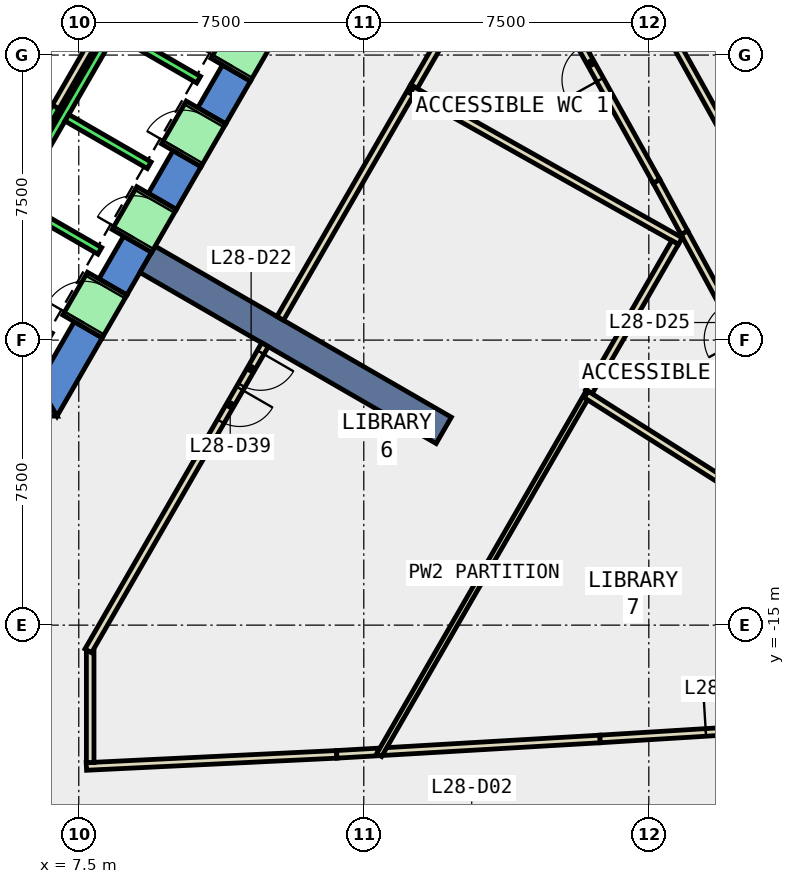
"""IFC4 building model, lengths in metres.
Left out: names, types, materials, properties, quantities, classifications, styles, units other than length and angle.
Written with IfcOpenShell. Run it as: python <this file> out.ifc"""

import sys

from ifc_helpers import new_model, si_unit, direction, frame, frame_2d, origin, place, context, subcontext, project, spatial, polyline, rectangle, outline, extrude, element, fill, save


model = new_model("IFC4")
c1 = context("Model", 3, precision=1e-05, world=origin(), true_north=direction((0.0, 1.0)))
c2 = subcontext(c1, "Body", "Model", "MODEL_VIEW")
j1 = project(units=[si_unit("LENGTHUNIT", "METRE"), si_unit("PLANEANGLEUNIT", "RADIAN")], contexts=[c1])
p1 = place(None, origin())
s1 = spatial("IfcSite", under=j1, at=p1, CompositionType="ELEMENT")
p2 = place(p1, origin())
s2 = spatial("IfcBuilding", under=s1, at=p2, CompositionType="ELEMENT")
p3 = place(p2, frame((0.0, 0.0, 128.6)))
s3 = spatial("IfcBuildingStorey", under=s2, at=p3, CompositionType="ELEMENT", Elevation=128.6)
p4 = place(p3, frame((0.0, 0.0, -0.4)))
e1 = element("IfcWall", 1, at=p4, inside=s3, PredefinedType="SHEAR", context=c2, shape_type="SweptSolid", body=[
    extrude(outline(polyline([(5.75, -8.65), (5.75, -9.5), (6.928, -9.5), (6.437, -8.65), (5.75, -8.65)])), origin(), (0.0, 0.0, 1.0), 4.0),
])
p5 = place(p3, frame((0.0, 0.0, -0.4)))
e2 = element("IfcWall", 2, at=p5, inside=s3, PredefinedType="SHEAR", context=c2, shape_type="SweptSolid", body=[
    extrude(outline(polyline([(8.117, -7.44), (7.381, -7.015), (6.437, -8.65), (6.928, -9.5), (8.117, -7.44)])), origin(), (0.0, 0.0, 1.0), 4.0),
])
p6 = place(p3, frame((0.0, 0.0, -0.4)))
e3 = element("IfcWall", 3, at=p6, inside=s3, PredefinedType="SHEAR", context=c2, shape_type="SweptSolid", body=[
    extrude(outline(polyline([(9.417, -5.189), (8.681, -4.764), (8.031, -5.889), (8.767, -6.314), (9.417, -5.189)])), origin(), (0.0, 0.0, 1.0), 4.0),
])
p7 = place(p3, frame((0.0, 0.0, -0.4)))
e4 = element("IfcWall", 4, at=p7, inside=s3, PredefinedType="SHEAR", context=c2, shape_type="SweptSolid", body=[
    extrude(outline(polyline([(10.717, -2.937), (9.981, -2.512), (9.331, -3.638), (10.067, -4.063), (10.717, -2.937)])), origin(), (0.0, 0.0, 1.0), 4.0),
])
p8 = place(p3, frame((0.0, 0.0, -0.4)))
e5 = element("IfcWall", 5, at=p8, inside=s3, PredefinedType="SHEAR", context=c2, shape_type="SweptSolid", body=[
    extrude(outline(polyline([(12.017, -0.686), (11.281, -0.261), (10.631, -1.386), (11.367, -1.811), (12.017, -0.686)])), origin(), (0.0, 0.0, 1.0), 4.0),
])
p9 = place(p3, frame((9.31, -5.375, -0.4), z_axis=(0.0, 0.0, 1.0), x_axis=(0.866017533419, -0.500013631625, 0.0)))
e6 = element("IfcWall", 6, at=p9, inside=s3, PredefinedType="SHEAR", context=c2, shape_type="SweptSolid", body=[
    extrude(rectangle(XDim=9.0, YDim=0.8, at=frame_2d((4.5, 0.0))), origin(), (0.0, 0.0, 1.0), 4.0),
])
p10 = place(p3, frame((7.7, -18.719, 0.0), z_axis=(0.0, 0.0, 1.0), x_axis=(0.998829118209, 0.048377604502, 0.0)))
e7 = element("IfcWall", 7, at=p10, inside=s3, PredefinedType="PARTITIONING", context=c2, shape_type="SweptSolid", body=[
    extrude(rectangle(XDim=6.596, YDim=0.2, at=frame_2d((3.298, 0.0))), origin(), (0.0, 0.0, 1.0), 3.6),
])
p11 = place(p3, frame((14.288, -18.4, 0.0), z_axis=(0.0, 0.0, 1.0), x_axis=(0.998339941676, 0.057596535097, 0.0)))
e8 = element("IfcWall", 8, at=p11, inside=s3, PredefinedType="PARTITIONING", context=c2, shape_type="SweptSolid", body=[
    extrude(rectangle(XDim=1.094, YDim=0.2, at=frame_2d((0.547, 0.0))), origin(), (0.0, 0.0, 1.0), 3.6),
])
p12 = place(p3, frame((23.437, -4.676, 0.0), z_axis=(0.0, 0.0, 1.0), x_axis=(-0.47686467088, 0.878976726465, 0.0)))
e9 = element("IfcWall", 9, at=p12, inside=s3, PredefinedType="PARTITIONING", context=c2, shape_type="SweptSolid", body=[
    extrude(rectangle(XDim=1.542, YDim=0.2, at=frame_2d((0.771, 0.0))), origin(), (0.0, 0.0, 1.0), 3.6),
])
p13 = place(p3, frame((22.702, -3.321, 0.0), z_axis=(0.0, 0.0, 1.0), x_axis=(-0.486304341235, 0.873789498504, 0.0)))
e10 = element("IfcWall", 10, at=p13, inside=s3, PredefinedType="PARTITIONING", context=c2, shape_type="SweptSolid", body=[
    extrude(rectangle(XDim=7.113, YDim=0.2, at=frame_2d((3.556, 0.0))), origin(), (0.0, 0.0, 1.0), 3.6),
])
p14 = place(p13, frame((3.057, 0.0, 0.0)))
e11 = element("IfcOpeningElement", 11, at=p14, cuts=e10, PredefinedType="OPENING", context=c2, shape_type="SweptSolid", body=[
    extrude(rectangle(XDim=1.0, YDim=2.1, at=frame_2d((0.5, 1.05))), frame((0.0, 0.11, 0.0), z_axis=(0.0, -1.0, 0.0), x_axis=(1.0, 0.0, 0.0)), (0.0, 0.0, 1.0), 0.22),
])
p15 = place(p3, frame((15.529, -18.328, 0.0), z_axis=(0.0, 0.0, 1.0), x_axis=(0.998293671523, 0.058393025246, 0.0)))
e12 = element("IfcWall", 12, at=p15, inside=s3, PredefinedType="PARTITIONING", context=c2, shape_type="SweptSolid", body=[
    extrude(rectangle(XDim=5.699, YDim=0.2, at=frame_2d((2.849, 0.0))), origin(), (0.0, 0.0, 1.0), 3.6),
])
p16 = place(p3, frame((21.218, -17.995, 0.0), z_axis=(0.0, 0.0, 1.0), x_axis=(0.998092528214, 0.061735768594, 0.0)))
e13 = element("IfcWall", 13, at=p16, inside=s3, PredefinedType="PARTITIONING", context=c2, shape_type="SweptSolid", body=[
    extrude(rectangle(XDim=6.576, YDim=0.2, at=frame_2d((3.288, 0.0))), origin(), (0.0, 0.0, 1.0), 3.6),
])
p17 = place(p16, frame((2.788, 0.0, 0.0)))
e14 = element("IfcOpeningElement", 14, at=p17, cuts=e13, PredefinedType="OPENING", context=c2, shape_type="SweptSolid", body=[
    extrude(rectangle(XDim=1.0, YDim=2.1, at=frame_2d((0.5, 1.05))), frame((0.0, 0.11, 0.0), z_axis=(0.0, -1.0, 0.0), x_axis=(1.0, 0.0, 0.0)), (0.0, 0.0, 1.0), 0.22),
])
p18 = place(p3, frame((26.095, -9.574, 0.0), z_axis=(0.0, 0.0, 1.0), x_axis=(-0.476963271937, 0.878923226012, 0.0)))
e15 = element("IfcWall", 15, at=p18, inside=s3, PredefinedType="PARTITIONING", context=c2, shape_type="SweptSolid", body=[
    extrude(rectangle(XDim=5.573, YDim=0.2, at=frame_2d((2.786, 0.0))), origin(), (0.0, 0.0, 1.0), 3.6),
])
p19 = place(p18, frame((2.386, 0.0, 0.0)))
e16 = element("IfcOpeningElement", 16, at=p19, cuts=e15, PredefinedType="OPENING", context=c2, shape_type="SweptSolid", body=[
    extrude(rectangle(XDim=1.0, YDim=2.1, at=frame_2d((0.5, 1.05))), frame((0.0, 0.11, 0.0), z_axis=(0.0, -1.0, 0.0), x_axis=(1.0, 0.0, 0.0)), (0.0, 0.0, 1.0), 0.22),
])
p20 = place(p3, frame((21.124, 4.04, 0.0), z_axis=(0.0, 0.0, 1.0), x_axis=(0.486229558972, -0.873831114107, 0.0)))
e17 = element("IfcWall", 17, at=p20, inside=s3, PredefinedType="PARTITIONING", context=c2, shape_type="SweptSolid", body=[
    extrude(rectangle(XDim=7.136, YDim=0.2, at=frame_2d((3.568, 0.0))), origin(), (0.0, 0.0, 1.0), 3.6),
])
p21 = place(p20, frame((3.143, 0.0, 0.0)))
e18 = element("IfcOpeningElement", 18, at=p21, cuts=e17, PredefinedType="OPENING", context=c2, shape_type="SweptSolid", body=[
    extrude(rectangle(XDim=1.0, YDim=2.1, at=frame_2d((0.5, 1.05))), frame((0.0, 0.11, 0.0), z_axis=(0.0, -1.0, 0.0), x_axis=(1.0, 0.0, 0.0)), (0.0, 0.0, 1.0), 0.22),
])
p22 = place(p3, frame((6.826, 0.522, 0.0), z_axis=(0.0, 0.0, 1.0), x_axis=(-0.500016722714, -0.866015748706, 0.0)))
e19 = element("IfcWall", 19, at=p22, inside=s3, PredefinedType="PARTITIONING", context=c2, shape_type="SweptSolid", body=[
    extrude(rectangle(XDim=1.7, YDim=0.2, at=frame_2d((0.85, 0.0))), origin(), (0.0, 0.0, 1.0), 3.6),
])
p23 = place(p3, frame((8.192, 0.888, 0.0), z_axis=(0.0, 0.0, 1.0), x_axis=(-0.499940625693, -0.866059680843, 0.0)))
e20 = element("IfcWall", 20, at=p23, inside=s3, PredefinedType="PARTITIONING", context=c2, shape_type="SweptSolid", body=[
    extrude(rectangle(XDim=2.68, YDim=0.2, at=frame_2d((1.34, 0.0))), origin(), (0.0, 0.0, 1.0), 3.6),
])
p24 = place(p3, frame((7.8, -15.69, 0.0), z_axis=(0.0, 0.0, 1.0), x_axis=(0.0, -1.0, 0.0)))
e21 = element("IfcWall", 21, at=p24, inside=s3, PredefinedType="PARTITIONING", context=c2, shape_type="SweptSolid", body=[
    extrude(rectangle(XDim=2.924, YDim=0.2, at=frame_2d((1.462, 0.0))), origin(), (0.0, 0.0, 1.0), 3.6),
])
p25 = place(p3, frame((16.32, -0.832, 0.0), z_axis=(0.0, 0.0, 1.0), x_axis=(-0.499951642806, -0.866053321023, 0.0)))
e22 = element("IfcWall", 22, at=p25, inside=s3, PredefinedType="PARTITIONING", context=c2, shape_type="SweptSolid", body=[
    extrude(rectangle(XDim=7.039, YDim=0.2, at=frame_2d((3.52, 0.0))), origin(), (0.0, 0.0, 1.0), 3.6),
])
p26 = place(p3, frame((18.91, 3.653, 0.0), z_axis=(0.0, 0.0, 1.0), x_axis=(-0.500052967229, -0.865994820981, 0.0)))
e23 = element("IfcWall", 23, at=p26, inside=s3, PredefinedType="PARTITIONING", context=c2, shape_type="SweptSolid", body=[
    extrude(rectangle(XDim=5.179, YDim=0.2, at=frame_2d((2.59, 0.0))), origin(), (0.0, 0.0, 1.0), 3.6),
])
p27 = place(p3, frame((16.27, -0.919, 0.0), z_axis=(0.0, 0.0, 1.0), x_axis=(0.871308980511, -0.490734816863, 0.0)))
e24 = element("IfcWall", 24, at=p27, inside=s3, PredefinedType="PARTITIONING", context=c2, shape_type="SweptSolid", body=[
    extrude(rectangle(XDim=8.1, YDim=0.2, at=frame_2d((4.05, 0.0))), origin(), (0.0, 0.0, 1.0), 3.6),
])
p28 = place(p3, frame((20.924, -8.858, 0.0), z_axis=(0.0, 0.0, 1.0), x_axis=(-0.499996828157, -0.866027235041, 0.0)))
e25 = element("IfcWall", 25, at=p28, inside=s3, PredefinedType="PARTITIONING", context=c2, shape_type="SweptSolid", body=[
    extrude(rectangle(XDim=11.04, YDim=0.15, at=frame_2d((5.52, 0.0))), origin(), (0.0, 0.0, 1.0), 3.6),
])
p29 = place(p3, frame((23.191, -4.932, 0.0), z_axis=(0.0, 0.0, 1.0), x_axis=(-0.500025458316, -0.86601070492, 0.0)))
e26 = element("IfcWall", 26, at=p29, inside=s3, PredefinedType="PARTITIONING", context=c2, shape_type="SweptSolid", body=[
    extrude(rectangle(XDim=4.533, YDim=0.2, at=frame_2d((2.267, 0.0))), origin(), (0.0, 0.0, 1.0), 3.6),
])
p30 = place(p3, frame((20.853, -8.931, 0.0), z_axis=(0.0, 0.0, 1.0), x_axis=(0.844869091455, -0.534973100542, 0.0)))
e27 = element("IfcWall", 27, at=p30, inside=s3, PredefinedType="PARTITIONING", context=c2, shape_type="SweptSolid", body=[
    extrude(rectangle(XDim=8.825, YDim=0.2, at=frame_2d((4.413, 0.0))), origin(), (0.0, 0.0, 1.0), 3.6),
])
p31 = place(p3, frame((12.401, -7.621, 0.0), z_axis=(0.0, 0.0, 1.0), x_axis=(-0.499983724212, -0.866034800411, 0.0)))
e28 = element("IfcWall", 28, at=p31, inside=s3, PredefinedType="PARTITIONING", context=c2, shape_type="SweptSolid", body=[
    extrude(rectangle(XDim=9.302, YDim=0.2, at=frame_2d((4.651, 0.0))), origin(), (0.0, 0.0, 1.0), 3.6),
])
p32 = place(p31, frame((0.231, 0.0, 0.0)))
e29 = element("IfcOpeningElement", 29, at=p32, cuts=e28, PredefinedType="OPENING", context=c2, shape_type="SweptSolid", body=[
    extrude(rectangle(XDim=1.0, YDim=2.1, at=frame_2d((0.5, 1.05))), frame((0.0, 0.11, 0.0), z_axis=(0.0, -1.0, 0.0), x_axis=(1.0, 0.0, 0.0)), (0.0, 0.0, 1.0), 0.22),
])
p33 = place(p31, frame((1.331, 0.0, 0.0)))
e30 = element("IfcOpeningElement", 30, at=p33, cuts=e28, PredefinedType="OPENING", context=c2, shape_type="SweptSolid", body=[
    extrude(rectangle(XDim=1.0, YDim=2.1, at=frame_2d((0.5, 1.05))), frame((0.0, 0.11, 0.0), z_axis=(0.0, -1.0, 0.0), x_axis=(1.0, 0.0, 0.0)), (0.0, 0.0, 1.0), 0.22),
])
p34 = place(p3, frame((5.492, -3.788, 0.0), z_axis=(0.0, 0.0, 1.0), x_axis=(0.500011755427, 0.866018616679, 0.0)))
e31 = element("IfcWall", 31, at=p34, inside=s3, PredefinedType="STANDARD", context=c2, shape_type="SweptSolid", body=[
    extrude(rectangle(XDim=2.8, YDim=0.2, at=frame_2d((1.4, 0.0))), origin(), (0.0, 0.0, 1.0), 3.6),
])
p35 = place(p3, frame((4.677, -0.2, 0.0), z_axis=(0.0, 0.0, 1.0), x_axis=(0.865973769406, -0.500089422704, 0.0)))
e32 = element("IfcWall", 32, at=p35, inside=s3, PredefinedType="STANDARD", context=c2, shape_type="SweptSolid", body=[
    extrude(rectangle(XDim=2.399, YDim=0.2, at=frame_2d((1.2, 0.0))), origin(), (0.0, 0.0, 1.0), 3.6),
])
p36 = place(p3, frame((4.451, -6.19, 0.0), z_axis=(0.0, 0.0, 1.0), x_axis=(0.50000090737, 0.866024879913, 0.0)))
e33 = element("IfcWall", 33, at=p36, inside=s3, PredefinedType="STANDARD", context=c2, shape_type="SweptSolid", body=[
    extrude(rectangle(XDim=10.6, YDim=0.2, at=frame_2d((5.3, 0.0))), origin(), (0.0, 0.0, 1.0), 3.6),
])
for number, where, z_axis, x_axis in (
    (34, (4.588, -6.153, 0.0), (0.0, 0.0, 1.0), (0.866, -0.5, 0.0)),
    (35, (5.888, -3.902, 0.0), (0.0, 0.0, 1.0), (0.866, -0.5, 0.0)),
    (36, (7.188, -1.65, 0.0), (0.0, 0.0, 1.0), (0.866, -0.5, 0.0)),
    (37, (8.488, 0.602, 0.0), (0.0, 0.0, 1.0), (0.866, -0.5, 0.0)),
):
    element("IfcWall", number, at=place(p3, frame(where, z_axis=z_axis, x_axis=x_axis)), inside=s3, PredefinedType="STANDARD", context=c2, shape_type="SweptSolid", body=[
        extrude(rectangle(XDim=2.5, YDim=0.2, at=frame_2d((1.25, 0.0))), origin(), (0.0, 0.0, 1.0), 3.6),
    ])
p37 = place(p3, frame((7.598, -7.14, 0.0), z_axis=(0.0, 0.0, 1.0), x_axis=(0.500362116554, 0.865816234728, 0.0)))
e38 = element("IfcWall", 38, at=p37, inside=s3, PredefinedType="STANDARD", context=c2, shape_type="SweptSolid", body=[
    extrude(rectangle(XDim=1.299, YDim=1.2, at=frame_2d((0.65, 0.0))), origin(), (0.0, 0.0, 1.0), 2.4),
])
p38 = place(p37, frame((0.1, 0.0, 0.0)))
e39 = element("IfcOpeningElement", 39, at=p38, cuts=e38, PredefinedType="OPENING", context=c2, shape_type="SweptSolid", body=[
    extrude(rectangle(XDim=1.1, YDim=2.3, at=frame_2d((0.55, 1.15))), frame((0.0, 0.61, 0.0), z_axis=(0.0, -1.0, 0.0), x_axis=(1.0, 0.0, 0.0)), (0.0, 0.0, 1.0), 1.22),
])
p39 = place(p3, frame((8.898, -4.889, 0.0), z_axis=(0.0, 0.0, 1.0), x_axis=(0.500036693733, 0.866004217611, 0.0)))
e40 = element("IfcWall", 40, at=p39, inside=s3, PredefinedType="STANDARD", context=c2, shape_type="SweptSolid", body=[
    extrude(rectangle(XDim=1.3, YDim=1.2, at=frame_2d((0.65, 0.0))), origin(), (0.0, 0.0, 1.0), 2.4),
])
p40 = place(p39, frame((0.1, 0.0, 0.0)))
e41 = element("IfcOpeningElement", 41, at=p40, cuts=e40, PredefinedType="OPENING", context=c2, shape_type="SweptSolid", body=[
    extrude(rectangle(XDim=1.1, YDim=2.3, at=frame_2d((0.55, 1.15))), frame((0.0, 0.61, 0.0), z_axis=(0.0, -1.0, 0.0), x_axis=(1.0, 0.0, 0.0)), (0.0, 0.0, 1.0), 1.22),
])
p41 = place(p3, frame((10.198, -2.637, 0.0), z_axis=(0.0, 0.0, 1.0), x_axis=(0.49989585183, 0.866085525409, 0.0)))
e42 = element("IfcWall", 42, at=p41, inside=s3, PredefinedType="STANDARD", context=c2, shape_type="SweptSolid", body=[
    extrude(rectangle(XDim=1.3, YDim=1.2, at=frame_2d((0.65, 0.0))), origin(), (0.0, 0.0, 1.0), 2.4),
])
p42 = place(p41, frame((0.1, 0.0, 0.0)))
e43 = element("IfcOpeningElement", 43, at=p42, cuts=e42, PredefinedType="OPENING", context=c2, shape_type="SweptSolid", body=[
    extrude(rectangle(XDim=1.1, YDim=2.3, at=frame_2d((0.55, 1.15))), frame((0.0, 0.61, 0.0), z_axis=(0.0, -1.0, 0.0), x_axis=(1.0, 0.0, 0.0)), (0.0, 0.0, 1.0), 1.22),
])
p43 = place(p3, frame((11.498, -0.385, 0.0), z_axis=(0.0, 0.0, 1.0), x_axis=(0.500221244143, 0.865897630733, 0.0)))
e44 = element("IfcWall", 44, at=p43, inside=s3, PredefinedType="STANDARD", context=c2, shape_type="SweptSolid", body=[
    extrude(rectangle(XDim=1.299, YDim=1.2, at=frame_2d((0.65, 0.0))), origin(), (0.0, 0.0, 1.0), 2.4),
])
p44 = place(p43, frame((0.1, 0.0, 0.0)))
e45 = element("IfcOpeningElement", 45, at=p44, cuts=e44, PredefinedType="OPENING", context=c2, shape_type="SweptSolid", body=[
    extrude(rectangle(XDim=1.1, YDim=2.3, at=frame_2d((0.55, 1.15))), frame((0.0, 0.61, 0.0), z_axis=(0.0, -1.0, 0.0), x_axis=(1.0, 0.0, 0.0)), (0.0, 0.0, 1.0), 1.22),
])
p45 = place(p32, origin())
e46 = element("IfcDoor", 46, at=p45, inside=s3, OperationType="SINGLE_SWING_LEFT", PredefinedType="DOOR", context=c2, shape_type="SweptSolid", body=[
    extrude(rectangle(XDim=1.0, YDim=2.1, at=frame_2d((0.5, 1.05))), frame((0.0, 0.025, 0.0), z_axis=(0.0, -1.0, 0.0), x_axis=(1.0, 0.0, 0.0)), (0.0, 0.0, 1.0), 0.05),
])
fill(e29, e46)
p46 = place(p14, origin())
e47 = element("IfcDoor", 47, at=p46, inside=s3, OperationType="SINGLE_SWING_LEFT", PredefinedType="DOOR", context=c2, shape_type="SweptSolid", body=[
    extrude(rectangle(XDim=1.0, YDim=2.1, at=frame_2d((0.5, 1.05))), frame((0.0, 0.025, 0.0), z_axis=(0.0, -1.0, 0.0), x_axis=(1.0, 0.0, 0.0)), (0.0, 0.0, 1.0), 0.05),
])
fill(e11, e47)
p47 = place(p17, origin())
e48 = element("IfcDoor", 48, at=p47, inside=s3, OperationType="SINGLE_SWING_LEFT", PredefinedType="DOOR", context=c2, shape_type="SweptSolid", body=[
    extrude(rectangle(XDim=1.0, YDim=2.1, at=frame_2d((0.5, 1.05))), frame((0.0, 0.025, 0.0), z_axis=(0.0, -1.0, 0.0), x_axis=(1.0, 0.0, 0.0)), (0.0, 0.0, 1.0), 0.05),
])
fill(e14, e48)
p48 = place(p33, origin())
e49 = element("IfcDoor", 49, at=p48, inside=s3, OperationType="SINGLE_SWING_RIGHT", PredefinedType="DOOR", context=c2, shape_type="SweptSolid", body=[
    extrude(rectangle(XDim=1.0, YDim=2.1, at=frame_2d((0.5, 1.05))), frame((0.0, 0.025, 0.0), z_axis=(0.0, -1.0, 0.0), x_axis=(1.0, 0.0, 0.0)), (0.0, 0.0, 1.0), 0.05),
])
fill(e30, e49)
p49 = place(p38, origin())
e50 = element("IfcDoor", 50, at=p49, inside=s3, OperationType="SLIDING_TO_LEFT", PredefinedType="DOOR", context=c2, shape_type="SweptSolid", body=[
    extrude(rectangle(XDim=1.1, YDim=2.3, at=frame_2d((0.55, 1.15))), frame((0.0, 0.025, 0.0), z_axis=(0.0, -1.0, 0.0), x_axis=(1.0, 0.0, 0.0)), (0.0, 0.0, 1.0), 0.05),
])
fill(e39, e50)
p50 = place(p40, origin())
e51 = element("IfcDoor", 51, at=p50, inside=s3, OperationType="SLIDING_TO_LEFT", PredefinedType="DOOR", context=c2, shape_type="SweptSolid", body=[
    extrude(rectangle(XDim=1.1, YDim=2.3, at=frame_2d((0.55, 1.15))), frame((0.0, 0.025, 0.0), z_axis=(0.0, -1.0, 0.0), x_axis=(1.0, 0.0, 0.0)), (0.0, 0.0, 1.0), 0.05),
])
fill(e41, e51)
p51 = place(p42, origin())
e52 = element("IfcDoor", 52, at=p51, inside=s3, OperationType="SLIDING_TO_LEFT", PredefinedType="DOOR", context=c2, shape_type="SweptSolid", body=[
    extrude(rectangle(XDim=1.1, YDim=2.3, at=frame_2d((0.55, 1.15))), frame((0.0, 0.025, 0.0), z_axis=(0.0, -1.0, 0.0), x_axis=(1.0, 0.0, 0.0)), (0.0, 0.0, 1.0), 0.05),
])
fill(e43, e52)
p52 = place(p44, origin())
e53 = element("IfcDoor", 53, at=p52, inside=s3, OperationType="SLIDING_TO_LEFT", PredefinedType="DOOR", context=c2, shape_type="SweptSolid", body=[
    extrude(rectangle(XDim=1.1, YDim=2.3, at=frame_2d((0.55, 1.15))), frame((0.0, 0.025, 0.0), z_axis=(0.0, -1.0, 0.0), x_axis=(1.0, 0.0, 0.0)), (0.0, 0.0, 1.0), 0.05),
])
fill(e45, e53)
save(model, sys.argv[1])
